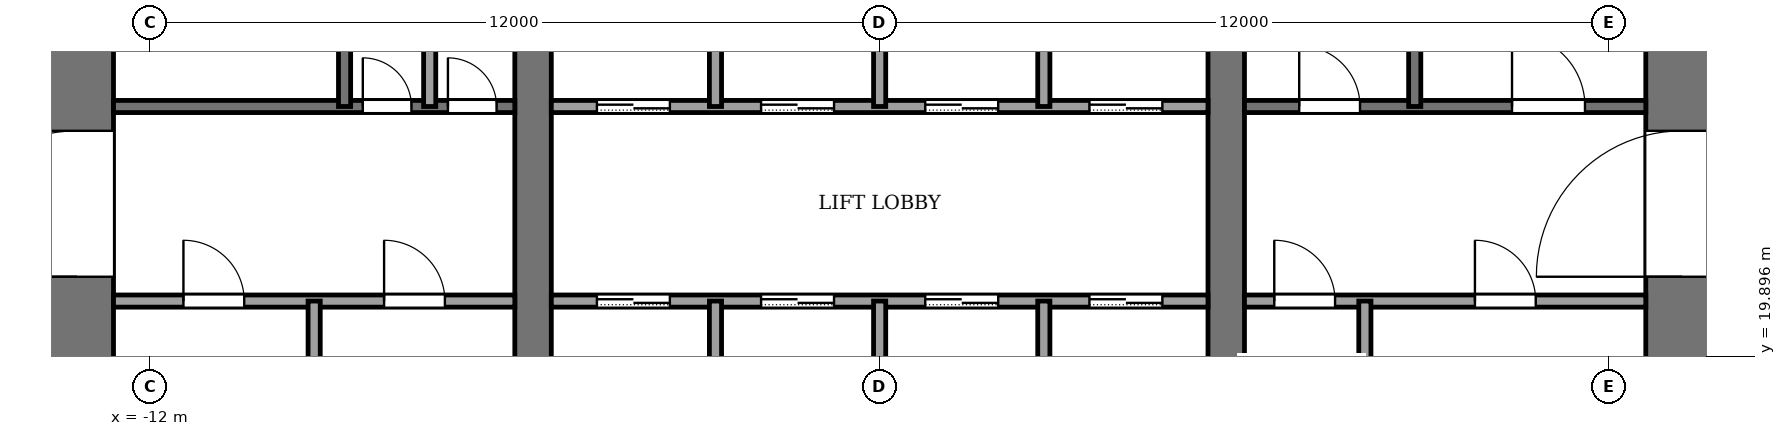
"""IFC4 building model, lengths in metres.
Left out: names, types, materials, properties, quantities, classifications, styles, units other than length and angle.
Written with IfcOpenShell. Run it as: python <this file> out.ifc"""

import sys

from ifc_helpers import new_model, si_unit, direction, frame, frame_2d, origin, place, context, subcontext, project, spatial, rectangle, extrude, element, fill, save


model = new_model("IFC4")
c1 = context("Model", 3, precision=1e-05, world=origin(), true_north=direction((0.0, 1.0)))
c2 = subcontext(c1, "Body", "Model", "MODEL_VIEW")
j1 = project(units=[si_unit("LENGTHUNIT", "METRE"), si_unit("PLANEANGLEUNIT", "RADIAN")], contexts=[c1])
p1 = place(None, origin())
s1 = spatial("IfcSite", under=j1, at=p1, CompositionType="ELEMENT")
p2 = place(p1, origin())
s2 = spatial("IfcBuilding", under=s1, at=p2, CompositionType="ELEMENT")
p3 = place(p2, frame((0.0, 0.0, 90.0)))
s3 = spatial("IfcBuildingStorey", under=s2, at=p3, CompositionType="ELEMENT", Elevation=90.0)
p4 = place(p3, frame((-13.2, 18.4, -0.13), z_axis=(0.0, 0.0, 1.0), x_axis=(0.0, 1.0, 0.0)))
e1 = element("IfcWall", 1, at=p4, inside=s3, PredefinedType="SHEAR", context=c2, shape_type="SweptSolid", body=[
    extrude(rectangle(XDim=19.2, YDim=1.2, at=frame_2d((9.6, 0.0))), origin(), (0.0, 0.0, 1.0), 4.0),
])
p5 = place(p4, frame((2.8, 0.0, 0.13)))
e2 = element("IfcOpeningElement", 2, at=p5, cuts=e1, PredefinedType="OPENING", context=c2, shape_type="SweptSolid", body=[
    extrude(rectangle(XDim=2.4, YDim=2.4, at=frame_2d((1.2, 1.2))), frame((0.0, 0.61, 0.0), z_axis=(0.0, -1.0, 0.0), x_axis=(1.0, 0.0, 0.0)), (0.0, 0.0, 1.0), 1.22),
])
p6 = place(p4, frame((13.4, 0.0, 0.13)))
e3 = element("IfcOpeningElement", 3, at=p6, cuts=e1, PredefinedType="OPENING", context=c2, shape_type="SweptSolid", body=[
    extrude(rectangle(XDim=1.4, YDim=2.2, at=frame_2d((0.7, 1.1))), frame((0.0, 0.61, 0.0), z_axis=(0.0, -1.0, 0.0), x_axis=(1.0, 0.0, 0.0)), (0.0, 0.0, 1.0), 1.22),
])
p7 = place(p3, frame((13.2, 18.4, -0.13), z_axis=(0.0, 0.0, 1.0), x_axis=(0.0, 1.0, 0.0)))
e4 = element("IfcWall", 4, at=p7, inside=s3, PredefinedType="SHEAR", context=c2, shape_type="SweptSolid", body=[
    extrude(rectangle(XDim=19.2, YDim=1.2, at=frame_2d((9.6, 0.0))), origin(), (0.0, 0.0, 1.0), 4.0),
])
p8 = place(p7, frame((2.8, 0.0, 0.13)))
e5 = element("IfcOpeningElement", 5, at=p8, cuts=e4, PredefinedType="OPENING", context=c2, shape_type="SweptSolid", body=[
    extrude(rectangle(XDim=2.4, YDim=2.4, at=frame_2d((1.2, 1.2))), frame((0.0, 0.61, 0.0), z_axis=(0.0, -1.0, 0.0), x_axis=(1.0, 0.0, 0.0)), (0.0, 0.0, 1.0), 1.22),
])
p9 = place(p7, frame((13.3, 0.0, 0.13)))
e6 = element("IfcOpeningElement", 6, at=p9, cuts=e4, PredefinedType="OPENING", context=c2, shape_type="SweptSolid", body=[
    extrude(rectangle(XDim=2.4, YDim=2.4, at=frame_2d((1.2, 1.2))), frame((0.0, 0.61, 0.0), z_axis=(0.0, -1.0, 0.0), x_axis=(1.0, 0.0, 0.0)), (0.0, 0.0, 1.0), 1.22),
])
p10 = place(p3, frame((-5.7, 18.4, -0.13), z_axis=(0.0, 0.0, 1.0), x_axis=(0.0, 1.0, 0.0)))
e7 = element("IfcWall", 7, at=p10, inside=s3, PredefinedType="SHEAR", context=c2, shape_type="SweptSolid", body=[
    extrude(rectangle(XDim=19.2, YDim=0.6, at=frame_2d((9.6, 0.0))), origin(), (0.0, 0.0, 1.0), 4.0),
])
p11 = place(p10, frame((8.35, 0.0, 0.13)))
e8 = element("IfcOpeningElement", 8, at=p11, cuts=e7, PredefinedType="OPENING", context=c2, shape_type="SweptSolid", body=[
    extrude(rectangle(XDim=0.9, YDim=2.1, at=frame_2d((0.45, 1.05))), frame((0.0, 0.31, 0.0), z_axis=(0.0, -1.0, 0.0), x_axis=(1.0, 0.0, 0.0)), (0.0, 0.0, 1.0), 0.62),
])
p12 = place(p3, frame((5.7, 18.4, -0.13), z_axis=(0.0, 0.0, 1.0), x_axis=(0.0, 1.0, 0.0)))
e9 = element("IfcWall", 9, at=p12, inside=s3, PredefinedType="SHEAR", context=c2, shape_type="SweptSolid", body=[
    extrude(rectangle(XDim=19.2, YDim=0.6, at=frame_2d((9.6, 0.0))), origin(), (0.0, 0.0, 1.0), 4.0),
])
p13 = place(p12, frame((8.35, 0.0, 0.13)))
e10 = element("IfcOpeningElement", 10, at=p13, cuts=e9, PredefinedType="OPENING", context=c2, shape_type="SweptSolid", body=[
    extrude(rectangle(XDim=0.9, YDim=2.1, at=frame_2d((0.45, 1.05))), frame((0.0, 0.31, 0.0), z_axis=(0.0, -1.0, 0.0), x_axis=(1.0, 0.0, 0.0)), (0.0, 0.0, 1.0), 0.62),
])
p14 = place(p12, frame((13.3, 0.0, 0.13)))
e11 = element("IfcOpeningElement", 11, at=p14, cuts=e9, PredefinedType="OPENING", context=c2, shape_type="SweptSolid", body=[
    extrude(rectangle(XDim=2.4, YDim=2.4, at=frame_2d((1.2, 1.2))), frame((0.0, 0.31, 0.0), z_axis=(0.0, -1.0, 0.0), x_axis=(1.0, 0.0, 0.0)), (0.0, 0.0, 1.0), 0.62),
])
p15 = place(p3, frame((-12.6, 20.8, 0.0), z_axis=(0.0, 0.0, 1.0), x_axis=(1.0, 0.0, 0.0)))
e12 = element("IfcWall", 12, at=p15, inside=s3, PredefinedType="PARTITIONING", context=c2, shape_type="SweptSolid", body=[
    extrude(rectangle(XDim=6.6, YDim=0.2, at=frame_2d((3.3, 0.0))), origin(), (0.0, 0.0, 1.0), 3.87),
])
p16 = place(p15, frame((1.15, 0.0, 0.0)))
e13 = element("IfcOpeningElement", 13, at=p16, cuts=e12, PredefinedType="OPENING", context=c2, shape_type="SweptSolid", body=[
    extrude(rectangle(XDim=1.0, YDim=2.1, at=frame_2d((0.5, 1.05))), frame((0.0, 0.11, 0.0), z_axis=(0.0, -1.0, 0.0), x_axis=(1.0, 0.0, 0.0)), (0.0, 0.0, 1.0), 0.22),
])
p17 = place(p15, frame((4.45, 0.0, 0.0)))
e14 = element("IfcOpeningElement", 14, at=p17, cuts=e12, PredefinedType="OPENING", context=c2, shape_type="SweptSolid", body=[
    extrude(rectangle(XDim=1.0, YDim=2.1, at=frame_2d((0.5, 1.05))), frame((0.0, 0.11, 0.0), z_axis=(0.0, -1.0, 0.0), x_axis=(1.0, 0.0, 0.0)), (0.0, 0.0, 1.0), 0.22),
])
p18 = place(p3, frame((-5.4, 20.8, 0.0), z_axis=(0.0, 0.0, 1.0), x_axis=(1.0, 0.0, 0.0)))
e15 = element("IfcWall", 15, at=p18, inside=s3, PredefinedType="PARTITIONING", context=c2, shape_type="SweptSolid", body=[
    extrude(rectangle(XDim=10.8, YDim=0.2, at=frame_2d((5.4, 0.0))), origin(), (0.0, 0.0, 1.0), 3.87),
])
p19 = place(p18, frame((0.75, 0.0, 0.0)))
e16 = element("IfcOpeningElement", 16, at=p19, cuts=e15, PredefinedType="OPENING", context=c2, shape_type="SweptSolid", body=[
    extrude(rectangle(XDim=1.2, YDim=2.2, at=frame_2d((0.6, 1.1))), frame((0.0, 0.11, 0.0), z_axis=(0.0, -1.0, 0.0), x_axis=(1.0, 0.0, 0.0)), (0.0, 0.0, 1.0), 0.22),
])
p20 = place(p18, frame((3.45, 0.0, 0.0)))
e17 = element("IfcOpeningElement", 17, at=p20, cuts=e15, PredefinedType="OPENING", context=c2, shape_type="SweptSolid", body=[
    extrude(rectangle(XDim=1.2, YDim=2.2, at=frame_2d((0.6, 1.1))), frame((0.0, 0.11, 0.0), z_axis=(0.0, -1.0, 0.0), x_axis=(1.0, 0.0, 0.0)), (0.0, 0.0, 1.0), 0.22),
])
p21 = place(p18, frame((6.15, 0.0, 0.0)))
e18 = element("IfcOpeningElement", 18, at=p21, cuts=e15, PredefinedType="OPENING", context=c2, shape_type="SweptSolid", body=[
    extrude(rectangle(XDim=1.2, YDim=2.2, at=frame_2d((0.6, 1.1))), frame((0.0, 0.11, 0.0), z_axis=(0.0, -1.0, 0.0), x_axis=(1.0, 0.0, 0.0)), (0.0, 0.0, 1.0), 0.22),
])
p22 = place(p18, frame((8.85, 0.0, 0.0)))
e19 = element("IfcOpeningElement", 19, at=p22, cuts=e15, PredefinedType="OPENING", context=c2, shape_type="SweptSolid", body=[
    extrude(rectangle(XDim=1.2, YDim=2.2, at=frame_2d((0.6, 1.1))), frame((0.0, 0.11, 0.0), z_axis=(0.0, -1.0, 0.0), x_axis=(1.0, 0.0, 0.0)), (0.0, 0.0, 1.0), 0.22),
])
p23 = place(p3, frame((6.0, 20.8, 0.0), z_axis=(0.0, 0.0, 1.0), x_axis=(1.0, 0.0, 0.0)))
e20 = element("IfcWall", 20, at=p23, inside=s3, PredefinedType="PARTITIONING", context=c2, shape_type="SweptSolid", body=[
    extrude(rectangle(XDim=6.6, YDim=0.2, at=frame_2d((3.3, 0.0))), origin(), (0.0, 0.0, 1.0), 3.87),
])
p24 = place(p23, frame((0.49, 0.0, 0.0)))
e21 = element("IfcOpeningElement", 21, at=p24, cuts=e20, PredefinedType="OPENING", context=c2, shape_type="SweptSolid", body=[
    extrude(rectangle(XDim=1.0, YDim=2.1, at=frame_2d((0.5, 1.05))), frame((0.0, 0.11, 0.0), z_axis=(0.0, -1.0, 0.0), x_axis=(1.0, 0.0, 0.0)), (0.0, 0.0, 1.0), 0.22),
])
p25 = place(p23, frame((3.79, 0.0, 0.0)))
e22 = element("IfcOpeningElement", 22, at=p25, cuts=e20, PredefinedType="OPENING", context=c2, shape_type="SweptSolid", body=[
    extrude(rectangle(XDim=1.0, YDim=2.1, at=frame_2d((0.5, 1.05))), frame((0.0, 0.11, 0.0), z_axis=(0.0, -1.0, 0.0), x_axis=(1.0, 0.0, 0.0)), (0.0, 0.0, 1.0), 0.22),
])
p26 = place(p3, frame((-12.6, 24.0, 0.0), z_axis=(0.0, 0.0, 1.0), x_axis=(1.0, 0.0, 0.0)))
e23 = element("IfcWall", 23, at=p26, inside=s3, PredefinedType="PARTITIONING", context=c2, shape_type="SweptSolid", body=[
    extrude(rectangle(XDim=6.6, YDim=0.2, at=frame_2d((3.3, 0.0))), origin(), (0.0, 0.0, 1.0), 3.87),
])
p27 = place(p26, frame((4.1, 0.0, 0.0)))
e24 = element("IfcOpeningElement", 24, at=p27, cuts=e23, PredefinedType="OPENING", context=c2, shape_type="SweptSolid", body=[
    extrude(rectangle(XDim=0.8, YDim=2.1, at=frame_2d((0.4, 1.05))), frame((0.0, 0.11, 0.0), z_axis=(0.0, -1.0, 0.0), x_axis=(1.0, 0.0, 0.0)), (0.0, 0.0, 1.0), 0.22),
])
p28 = place(p26, frame((5.5, 0.0, 0.0)))
e25 = element("IfcOpeningElement", 25, at=p28, cuts=e23, PredefinedType="OPENING", context=c2, shape_type="SweptSolid", body=[
    extrude(rectangle(XDim=0.8, YDim=2.1, at=frame_2d((0.4, 1.05))), frame((0.0, 0.11, 0.0), z_axis=(0.0, -1.0, 0.0), x_axis=(1.0, 0.0, 0.0)), (0.0, 0.0, 1.0), 0.22),
])
p29 = place(p3, frame((-5.4, 24.0, 0.0), z_axis=(0.0, 0.0, 1.0), x_axis=(1.0, 0.0, 0.0)))
e26 = element("IfcWall", 26, at=p29, inside=s3, PredefinedType="PARTITIONING", context=c2, shape_type="SweptSolid", body=[
    extrude(rectangle(XDim=10.8, YDim=0.2, at=frame_2d((5.4, 0.0))), origin(), (0.0, 0.0, 1.0), 3.87),
])
p30 = place(p29, frame((0.75, 0.0, 0.0)))
e27 = element("IfcOpeningElement", 27, at=p30, cuts=e26, PredefinedType="OPENING", context=c2, shape_type="SweptSolid", body=[
    extrude(rectangle(XDim=1.2, YDim=2.2, at=frame_2d((0.6, 1.1))), frame((0.0, 0.11, 0.0), z_axis=(0.0, -1.0, 0.0), x_axis=(1.0, 0.0, 0.0)), (0.0, 0.0, 1.0), 0.22),
])
p31 = place(p29, frame((3.45, 0.0, 0.0)))
e28 = element("IfcOpeningElement", 28, at=p31, cuts=e26, PredefinedType="OPENING", context=c2, shape_type="SweptSolid", body=[
    extrude(rectangle(XDim=1.2, YDim=2.2, at=frame_2d((0.6, 1.1))), frame((0.0, 0.11, 0.0), z_axis=(0.0, -1.0, 0.0), x_axis=(1.0, 0.0, 0.0)), (0.0, 0.0, 1.0), 0.22),
])
p32 = place(p29, frame((6.15, 0.0, 0.0)))
e29 = element("IfcOpeningElement", 29, at=p32, cuts=e26, PredefinedType="OPENING", context=c2, shape_type="SweptSolid", body=[
    extrude(rectangle(XDim=1.2, YDim=2.2, at=frame_2d((0.6, 1.1))), frame((0.0, 0.11, 0.0), z_axis=(0.0, -1.0, 0.0), x_axis=(1.0, 0.0, 0.0)), (0.0, 0.0, 1.0), 0.22),
])
p33 = place(p29, frame((8.85, 0.0, 0.0)))
e30 = element("IfcOpeningElement", 30, at=p33, cuts=e26, PredefinedType="OPENING", context=c2, shape_type="SweptSolid", body=[
    extrude(rectangle(XDim=1.2, YDim=2.2, at=frame_2d((0.6, 1.1))), frame((0.0, 0.11, 0.0), z_axis=(0.0, -1.0, 0.0), x_axis=(1.0, 0.0, 0.0)), (0.0, 0.0, 1.0), 0.22),
])
p34 = place(p3, frame((6.0, 24.0, 0.0), z_axis=(0.0, 0.0, 1.0), x_axis=(1.0, 0.0, 0.0)))
e31 = element("IfcWall", 31, at=p34, inside=s3, PredefinedType="PARTITIONING", context=c2, shape_type="SweptSolid", body=[
    extrude(rectangle(XDim=6.6, YDim=0.2, at=frame_2d((3.3, 0.0))), origin(), (0.0, 0.0, 1.0), 3.87),
])
p35 = place(p34, frame((0.9, 0.0, 0.0)))
e32 = element("IfcOpeningElement", 32, at=p35, cuts=e31, PredefinedType="OPENING", context=c2, shape_type="SweptSolid", body=[
    extrude(rectangle(XDim=1.0, YDim=2.1, at=frame_2d((0.5, 1.05))), frame((0.0, 0.11, 0.0), z_axis=(0.0, -1.0, 0.0), x_axis=(1.0, 0.0, 0.0)), (0.0, 0.0, 1.0), 0.22),
])
p36 = place(p34, frame((4.4, 0.0, 0.0)))
e33 = element("IfcOpeningElement", 33, at=p36, cuts=e31, PredefinedType="OPENING", context=c2, shape_type="SweptSolid", body=[
    extrude(rectangle(XDim=1.2, YDim=2.2, at=frame_2d((0.6, 1.1))), frame((0.0, 0.11, 0.0), z_axis=(0.0, -1.0, 0.0), x_axis=(1.0, 0.0, 0.0)), (0.0, 0.0, 1.0), 0.22),
])
p37 = place(p3, frame((-9.3, 18.4, 0.0), z_axis=(0.0, 0.0, 1.0), x_axis=(0.0, 1.0, 0.0)))
e34 = element("IfcWall", 34, at=p37, inside=s3, PredefinedType="PARTITIONING", context=c2, shape_type="SweptSolid", body=[
    extrude(rectangle(XDim=2.4, YDim=0.2, at=frame_2d((1.2, 0.0))), origin(), (0.0, 0.0, 1.0), 3.87),
])
for number, where, z_axis, x_axis in (
    (35, (-8.8, 24.0, 0.0), (0.0, 0.0, 1.0), (0.0, 1.0, 0.0)),
    (36, (-7.4, 24.0, 0.0), (0.0, 0.0, 1.0), (0.0, 1.0, 0.0)),
):
    element("IfcWall", number, at=place(p3, frame(where, z_axis=z_axis, x_axis=x_axis)), inside=s3, PredefinedType="PARTITIONING", context=c2, shape_type="SweptSolid", body=[
        extrude(rectangle(XDim=7.4, YDim=0.2, at=frame_2d((3.7, 0.0))), origin(), (0.0, 0.0, 1.0), 3.87),
    ])
p38 = place(p3, frame((-2.7, 18.4, 0.0), z_axis=(0.0, 0.0, 1.0), x_axis=(0.0, 1.0, 0.0)))
e37 = element("IfcWall", 37, at=p38, inside=s3, PredefinedType="PARTITIONING", context=c2, shape_type="SweptSolid", body=[
    extrude(rectangle(XDim=2.4, YDim=0.2, at=frame_2d((1.2, 0.0))), origin(), (0.0, 0.0, 1.0), 3.87),
])
p39 = place(p3, frame((-2.7, 24.0, 0.0), z_axis=(0.0, 0.0, 1.0), x_axis=(0.0, 1.0, 0.0)))
e38 = element("IfcWall", 38, at=p39, inside=s3, PredefinedType="PARTITIONING", context=c2, shape_type="SweptSolid", body=[
    extrude(rectangle(XDim=2.4, YDim=0.2, at=frame_2d((1.2, 0.0))), origin(), (0.0, 0.0, 1.0), 3.87),
])
p40 = place(p3, frame((0.0, 18.4, 0.0), z_axis=(0.0, 0.0, 1.0), x_axis=(0.0, 1.0, 0.0)))
e39 = element("IfcWall", 39, at=p40, inside=s3, PredefinedType="PARTITIONING", context=c2, shape_type="SweptSolid", body=[
    extrude(rectangle(XDim=2.4, YDim=0.2, at=frame_2d((1.2, 0.0))), origin(), (0.0, 0.0, 1.0), 3.87),
])
p41 = place(p3, frame((0.0, 24.0, 0.0), z_axis=(0.0, 0.0, 1.0), x_axis=(0.0, 1.0, 0.0)))
e40 = element("IfcWall", 40, at=p41, inside=s3, PredefinedType="PARTITIONING", context=c2, shape_type="SweptSolid", body=[
    extrude(rectangle(XDim=6.4, YDim=0.2, at=frame_2d((3.2, 0.0))), origin(), (0.0, 0.0, 1.0), 3.87),
])
p42 = place(p3, frame((2.7, 18.4, 0.0), z_axis=(0.0, 0.0, 1.0), x_axis=(0.0, 1.0, 0.0)))
e41 = element("IfcWall", 41, at=p42, inside=s3, PredefinedType="PARTITIONING", context=c2, shape_type="SweptSolid", body=[
    extrude(rectangle(XDim=2.4, YDim=0.2, at=frame_2d((1.2, 0.0))), origin(), (0.0, 0.0, 1.0), 3.87),
])
p43 = place(p3, frame((2.7, 24.0, 0.0), z_axis=(0.0, 0.0, 1.0), x_axis=(0.0, 1.0, 0.0)))
e42 = element("IfcWall", 42, at=p43, inside=s3, PredefinedType="PARTITIONING", context=c2, shape_type="SweptSolid", body=[
    extrude(rectangle(XDim=2.4, YDim=0.2, at=frame_2d((1.2, 0.0))), origin(), (0.0, 0.0, 1.0), 3.87),
])
p44 = place(p3, frame((7.98, 18.4, 0.0), z_axis=(0.0, 0.0, 1.0), x_axis=(0.0, 1.0, 0.0)))
e43 = element("IfcWall", 43, at=p44, inside=s3, PredefinedType="PARTITIONING", context=c2, shape_type="SweptSolid", body=[
    extrude(rectangle(XDim=2.4, YDim=0.2, at=frame_2d((1.2, 0.0))), origin(), (0.0, 0.0, 1.0), 3.87),
])
p45 = place(p3, frame((8.8, 24.0, 0.0), z_axis=(0.0, 0.0, 1.0), x_axis=(0.0, 1.0, 0.0)))
e44 = element("IfcWall", 44, at=p45, inside=s3, PredefinedType="PARTITIONING", context=c2, shape_type="SweptSolid", body=[
    extrude(rectangle(XDim=7.4, YDim=0.2, at=frame_2d((3.7, 0.0))), origin(), (0.0, 0.0, 1.0), 3.87),
])
p46 = place(p19, origin())
e45 = element("IfcDoor", 45, at=p46, inside=s3, OperationType="SLIDING_TO_LEFT", PredefinedType="DOOR", context=c2, shape_type="SweptSolid", body=[
    extrude(rectangle(XDim=1.2, YDim=2.2, at=frame_2d((0.6, 1.1))), frame((0.0, 0.025, 0.0), z_axis=(0.0, -1.0, 0.0), x_axis=(1.0, 0.0, 0.0)), (0.0, 0.0, 1.0), 0.05),
])
fill(e16, e45)
p47 = place(p20, origin())
e46 = element("IfcDoor", 46, at=p47, inside=s3, OperationType="SLIDING_TO_LEFT", PredefinedType="DOOR", context=c2, shape_type="SweptSolid", body=[
    extrude(rectangle(XDim=1.2, YDim=2.2, at=frame_2d((0.6, 1.1))), frame((0.0, 0.025, 0.0), z_axis=(0.0, -1.0, 0.0), x_axis=(1.0, 0.0, 0.0)), (0.0, 0.0, 1.0), 0.05),
])
fill(e17, e46)
p48 = place(p21, origin())
e47 = element("IfcDoor", 47, at=p48, inside=s3, OperationType="SLIDING_TO_LEFT", PredefinedType="DOOR", context=c2, shape_type="SweptSolid", body=[
    extrude(rectangle(XDim=1.2, YDim=2.2, at=frame_2d((0.6, 1.1))), frame((0.0, 0.025, 0.0), z_axis=(0.0, -1.0, 0.0), x_axis=(1.0, 0.0, 0.0)), (0.0, 0.0, 1.0), 0.05),
])
fill(e18, e47)
p49 = place(p22, origin())
e48 = element("IfcDoor", 48, at=p49, inside=s3, OperationType="SLIDING_TO_LEFT", PredefinedType="DOOR", context=c2, shape_type="SweptSolid", body=[
    extrude(rectangle(XDim=1.2, YDim=2.2, at=frame_2d((0.6, 1.1))), frame((0.0, 0.025, 0.0), z_axis=(0.0, -1.0, 0.0), x_axis=(1.0, 0.0, 0.0)), (0.0, 0.0, 1.0), 0.05),
])
fill(e19, e48)
p50 = place(p30, origin())
e49 = element("IfcDoor", 49, at=p50, inside=s3, OperationType="SLIDING_TO_LEFT", PredefinedType="DOOR", context=c2, shape_type="SweptSolid", body=[
    extrude(rectangle(XDim=1.2, YDim=2.2, at=frame_2d((0.6, 1.1))), frame((0.0, 0.025, 0.0), z_axis=(0.0, -1.0, 0.0), x_axis=(1.0, 0.0, 0.0)), (0.0, 0.0, 1.0), 0.05),
])
fill(e27, e49)
p51 = place(p31, origin())
e50 = element("IfcDoor", 50, at=p51, inside=s3, OperationType="SLIDING_TO_LEFT", PredefinedType="DOOR", context=c2, shape_type="SweptSolid", body=[
    extrude(rectangle(XDim=1.2, YDim=2.2, at=frame_2d((0.6, 1.1))), frame((0.0, 0.025, 0.0), z_axis=(0.0, -1.0, 0.0), x_axis=(1.0, 0.0, 0.0)), (0.0, 0.0, 1.0), 0.05),
])
fill(e28, e50)
p52 = place(p32, origin())
e51 = element("IfcDoor", 51, at=p52, inside=s3, OperationType="SLIDING_TO_LEFT", PredefinedType="DOOR", context=c2, shape_type="SweptSolid", body=[
    extrude(rectangle(XDim=1.2, YDim=2.2, at=frame_2d((0.6, 1.1))), frame((0.0, 0.025, 0.0), z_axis=(0.0, -1.0, 0.0), x_axis=(1.0, 0.0, 0.0)), (0.0, 0.0, 1.0), 0.05),
])
fill(e29, e51)
p53 = place(p33, origin())
e52 = element("IfcDoor", 52, at=p53, inside=s3, OperationType="SLIDING_TO_LEFT", PredefinedType="DOOR", context=c2, shape_type="SweptSolid", body=[
    extrude(rectangle(XDim=1.2, YDim=2.2, at=frame_2d((0.6, 1.1))), frame((0.0, 0.025, 0.0), z_axis=(0.0, -1.0, 0.0), x_axis=(1.0, 0.0, 0.0)), (0.0, 0.0, 1.0), 0.05),
])
fill(e30, e52)
p54 = place(p16, origin())
e53 = element("IfcDoor", 53, at=p54, inside=s3, OperationType="SINGLE_SWING_LEFT", PredefinedType="DOOR", context=c2, shape_type="SweptSolid", body=[
    extrude(rectangle(XDim=1.0, YDim=2.1, at=frame_2d((0.5, 1.05))), frame((0.0, 0.025, 0.0), z_axis=(0.0, -1.0, 0.0), x_axis=(1.0, 0.0, 0.0)), (0.0, 0.0, 1.0), 0.05),
])
fill(e13, e53)
p55 = place(p17, origin())
e54 = element("IfcDoor", 54, at=p55, inside=s3, OperationType="SINGLE_SWING_LEFT", PredefinedType="DOOR", context=c2, shape_type="SweptSolid", body=[
    extrude(rectangle(XDim=1.0, YDim=2.1, at=frame_2d((0.5, 1.05))), frame((0.0, 0.025, 0.0), z_axis=(0.0, -1.0, 0.0), x_axis=(1.0, 0.0, 0.0)), (0.0, 0.0, 1.0), 0.05),
])
fill(e14, e54)
p56 = place(p24, origin())
e55 = element("IfcDoor", 55, at=p56, inside=s3, OperationType="SINGLE_SWING_RIGHT", PredefinedType="DOOR", context=c2, shape_type="SweptSolid", body=[
    extrude(rectangle(XDim=1.0, YDim=2.1, at=frame_2d((0.5, 1.05))), frame((0.0, 0.025, 0.0), z_axis=(0.0, -1.0, 0.0), x_axis=(1.0, 0.0, 0.0)), (0.0, 0.0, 1.0), 0.05),
])
fill(e21, e55)
p57 = place(p25, origin())
e56 = element("IfcDoor", 56, at=p57, inside=s3, OperationType="SINGLE_SWING_RIGHT", PredefinedType="DOOR", context=c2, shape_type="SweptSolid", body=[
    extrude(rectangle(XDim=1.0, YDim=2.1, at=frame_2d((0.5, 1.05))), frame((0.0, 0.025, 0.0), z_axis=(0.0, -1.0, 0.0), x_axis=(1.0, 0.0, 0.0)), (0.0, 0.0, 1.0), 0.05),
])
fill(e22, e56)
p58 = place(p27, origin())
e57 = element("IfcDoor", 57, at=p58, inside=s3, OperationType="SINGLE_SWING_LEFT", PredefinedType="DOOR", context=c2, shape_type="SweptSolid", body=[
    extrude(rectangle(XDim=0.8, YDim=2.1, at=frame_2d((0.4, 1.05))), frame((0.0, 0.025, 0.0), z_axis=(0.0, -1.0, 0.0), x_axis=(1.0, 0.0, 0.0)), (0.0, 0.0, 1.0), 0.05),
])
fill(e24, e57)
p59 = place(p28, origin())
e58 = element("IfcDoor", 58, at=p59, inside=s3, OperationType="SINGLE_SWING_RIGHT", PredefinedType="DOOR", context=c2, shape_type="SweptSolid", body=[
    extrude(rectangle(XDim=0.8, YDim=2.1, at=frame_2d((0.4, 1.05))), frame((0.0, 0.025, 0.0), z_axis=(0.0, -1.0, 0.0), x_axis=(1.0, 0.0, 0.0)), (0.0, 0.0, 1.0), 0.05),
])
fill(e25, e58)
p60 = place(p35, origin())
e59 = element("IfcDoor", 59, at=p60, inside=s3, OperationType="SINGLE_SWING_RIGHT", PredefinedType="DOOR", context=c2, shape_type="SweptSolid", body=[
    extrude(rectangle(XDim=1.0, YDim=2.1, at=frame_2d((0.5, 1.05))), frame((0.0, 0.025, 0.0), z_axis=(0.0, -1.0, 0.0), x_axis=(1.0, 0.0, 0.0)), (0.0, 0.0, 1.0), 0.05),
])
fill(e32, e59)
p61 = place(p36, origin())
e60 = element("IfcDoor", 60, at=p61, inside=s3, OperationType="SINGLE_SWING_LEFT", PredefinedType="DOOR", context=c2, shape_type="SweptSolid", body=[
    extrude(rectangle(XDim=1.2, YDim=2.2, at=frame_2d((0.6, 1.1))), frame((0.0, 0.025, 0.0), z_axis=(0.0, -1.0, 0.0), x_axis=(1.0, 0.0, 0.0)), (0.0, 0.0, 1.0), 0.05),
])
fill(e33, e60)
p62 = place(p5, origin())
e61 = element("IfcDoor", 61, at=p62, inside=s3, OperationType="DOUBLE_DOOR_SINGLE_SWING", PredefinedType="DOOR", context=c2, shape_type="SweptSolid", body=[
    extrude(rectangle(XDim=2.4, YDim=2.4, at=frame_2d((1.2, 1.2))), frame((0.0, 0.025, 0.0), z_axis=(0.0, -1.0, 0.0), x_axis=(1.0, 0.0, 0.0)), (0.0, 0.0, 1.0), 0.05),
])
fill(e2, e61)
p63 = place(p8, origin())
e62 = element("IfcDoor", 62, at=p63, inside=s3, OperationType="DOUBLE_DOOR_SINGLE_SWING", PredefinedType="DOOR", context=c2, shape_type="SweptSolid", body=[
    extrude(rectangle(XDim=2.4, YDim=2.4, at=frame_2d((1.2, 1.2))), frame((0.0, 0.025, 0.0), z_axis=(0.0, -1.0, 0.0), x_axis=(1.0, 0.0, 0.0)), (0.0, 0.0, 1.0), 0.05),
])
fill(e5, e62)
save(model, sys.argv[1])
